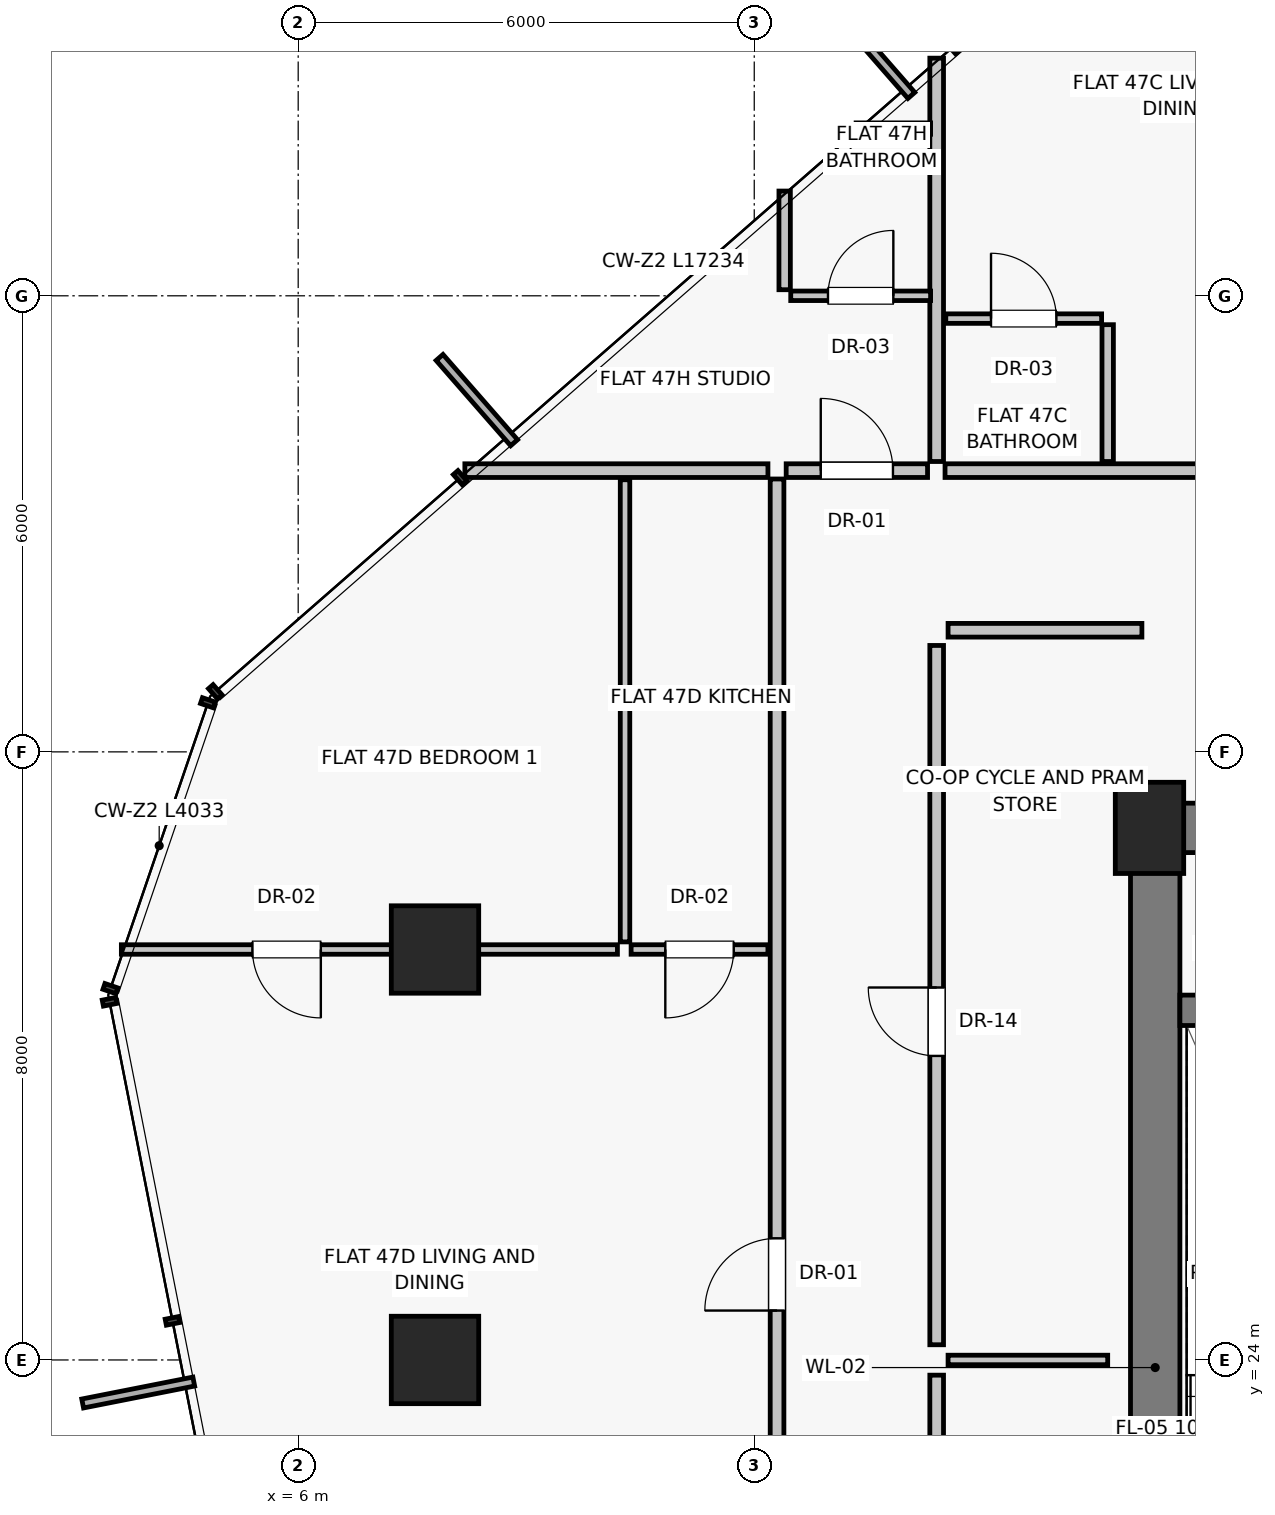
"""IFC4 building model, lengths in metres.
Left out: names, types, materials, properties, quantities, classifications, styles, units other than length and angle.
Written with IfcOpenShell. Run it as: python <this file> out.ifc"""

import sys

from ifc_helpers import new_model, si_unit, direction, frame, frame_2d, origin, origin_2d, place, context, subcontext, project, spatial, rectangle, extrude, source, transform, mapped, element, fill, save


model = new_model("IFC4")
c1 = context("Model", 3, precision=1e-05, world=origin(), true_north=direction((0.0, 1.0)))
c2 = subcontext(c1, "Body", "Model", "MODEL_VIEW")
j1 = project(units=[si_unit("LENGTHUNIT", "METRE"), si_unit("PLANEANGLEUNIT", "RADIAN")], contexts=[c1])
p1 = place(None, origin())
s1 = spatial("IfcSite", under=j1, at=p1, CompositionType="ELEMENT")
p2 = place(p1, origin())
s2 = spatial("IfcBuilding", under=s1, at=p2, CompositionType="ELEMENT")
p3 = place(p2, frame((0.0, 0.0, 166.3)))
s3 = spatial("IfcBuildingStorey", under=s2, at=p3, CompositionType="ELEMENT", Elevation=166.3)
p4 = place(p3, frame((17.2, 31.0, 0.0), z_axis=(0.0, 0.0, 1.0), x_axis=(1.0, 0.0, 0.0)))
e1 = element("IfcColumn", 1, at=p4, inside=s3, PredefinedType="PILASTER", context=c2, shape_type="SweptSolid", body=[
    extrude(rectangle(XDim=0.9, YDim=1.2, at=origin_2d()), origin(), (0.0, 0.0, 1.0), 3.25),
])
for number, where, z_axis, x_axis in (
    (2, (7.8, 29.4, 0.0), (0.0, 0.0, 1.0), (1.0, 0.0, 0.0)),
    (3, (7.8, 24.0, 0.0), (0.0, 0.0, 1.0), (1.0, 0.0, 0.0)),
):
    element("IfcColumn", number, at=place(p3, frame(where, z_axis=z_axis, x_axis=x_axis)), inside=s3, PredefinedType="COLUMN", context=c2, shape_type="SweptSolid", body=[
        extrude(rectangle(XDim=1.15, YDim=1.15, at=origin_2d()), origin(), (0.0, 0.0, 1.0), 3.25),
    ])
p5 = place(p3, frame((17.275, 16.8, 0.0), z_axis=(0.0, 0.0, 1.0), x_axis=(0.0, 1.0, 0.0)))
e4 = element("IfcWall", 4, at=p5, inside=s3, PredefinedType="SHEAR", context=c2, shape_type="SweptSolid", body=[
    extrude(rectangle(XDim=14.2, YDim=0.65, at=frame_2d((7.1, 0.0))), origin(), (0.0, 0.0, 1.0), 2.93),
])
p6 = place(p3, frame((17.2, 31.0, 0.0), z_axis=(0.0, 0.0, 1.0), x_axis=(1.0, 0.0, 0.0)))
e5 = element("IfcWall", 5, at=p6, inside=s3, PredefinedType="SHEAR", context=c2, shape_type="SweptSolid", body=[
    extrude(rectangle(XDim=3.8, YDim=0.65, at=frame_2d((1.9, 0.0))), origin(), (0.0, 0.0, 1.0), 2.93),
])
p7 = place(p6, frame((1.25, 0.0, 0.0)))
e6 = element("IfcOpeningElement", 6, at=p7, cuts=e5, PredefinedType="OPENING", context=c2, shape_type="SweptSolid", body=[
    extrude(rectangle(XDim=0.86, YDim=2.01, at=frame_2d((0.43, 1.005))), frame((0.0, 0.335, 0.0), z_axis=(0.0, -1.0, 0.0), x_axis=(1.0, 0.0, 0.0)), (0.0, 0.0, 1.0), 0.67),
])
p8 = place(p3, frame((17.6, 28.6, 0.0), z_axis=(0.0, 0.0, 1.0), x_axis=(1.0, 0.0, 0.0)))
e7 = element("IfcWall", 7, at=p8, inside=s3, PredefinedType="SHEAR", context=c2, shape_type="SweptSolid", body=[
    extrude(rectangle(XDim=3.4, YDim=0.4, at=frame_2d((1.7, 0.0))), origin(), (0.0, 0.0, 1.0), 2.93),
])
p9 = place(p3, frame((14.4, 14.4, 0.0), z_axis=(0.0, 0.0, 1.0), x_axis=(0.0, 1.0, 0.0)))
e8 = element("IfcWall", 8, at=p9, inside=s3, PredefinedType="PARTITIONING", context=c2, shape_type="SweptSolid", body=[
    extrude(rectangle(XDim=9.4, YDim=0.18, at=frame_2d((4.7, 0.0))), origin(), (0.0, 0.0, 1.0), 2.93),
])
p10 = place(p9, frame((3.8, 0.0, 0.0)))
e9 = element("IfcOpeningElement", 9, at=p10, cuts=e8, PredefinedType="OPENING", context=c2, shape_type="SweptSolid", body=[
    extrude(rectangle(XDim=0.9, YDim=2.01, at=frame_2d((0.45, 1.005))), frame((0.0, 0.1, 0.0), z_axis=(0.0, -1.0, 0.0), x_axis=(1.0, 0.0, 0.0)), (0.0, 0.0, 1.0), 0.2),
])
p11 = place(p3, frame((14.4, 24.2, 0.0), z_axis=(0.0, 0.0, 1.0), x_axis=(0.0, 1.0, 0.0)))
e10 = element("IfcWall", 10, at=p11, inside=s3, PredefinedType="PARTITIONING", context=c2, shape_type="SweptSolid", body=[
    extrude(rectangle(XDim=9.2, YDim=0.18, at=frame_2d((4.6, 0.0))), origin(), (0.0, 0.0, 1.0), 2.93),
])
p12 = place(p11, frame((3.8, 0.0, 0.0)))
e11 = element("IfcOpeningElement", 11, at=p12, cuts=e10, PredefinedType="OPENING", context=c2, shape_type="SweptSolid", body=[
    extrude(rectangle(XDim=0.9, YDim=2.01, at=frame_2d((0.45, 1.005))), frame((0.0, 0.1, 0.0), z_axis=(0.0, -1.0, 0.0), x_axis=(1.0, 0.0, 0.0)), (0.0, 0.0, 1.0), 0.2),
])
p13 = place(p3, frame((14.55, 24.0, 0.0), z_axis=(0.0, 0.0, 1.0), x_axis=(1.0, 0.0, 0.0)))
e12 = element("IfcWall", 12, at=p13, inside=s3, PredefinedType="PARTITIONING", context=c2, shape_type="SweptSolid", body=[
    extrude(rectangle(XDim=2.1, YDim=0.125, at=frame_2d((1.05, 0.0))), origin(), (0.0, 0.0, 1.0), 2.93),
])
p14 = place(p3, frame((14.55, 33.6, 0.0), z_axis=(0.0, 0.0, 1.0), x_axis=(1.0, 0.0, 0.0)))
e13 = element("IfcWall", 13, at=p14, inside=s3, PredefinedType="PARTITIONING", context=c2, shape_type="SweptSolid", body=[
    extrude(rectangle(XDim=2.55, YDim=0.18, at=frame_2d((1.275, 0.0))), origin(), (0.0, 0.0, 1.0), 2.93),
])
p15 = place(p3, frame((14.4, 35.82, 0.0), z_axis=(0.0, 0.0, 1.0), x_axis=(0.0, 1.0, 0.0)))
e14 = element("IfcWall", 14, at=p15, inside=s3, PredefinedType="PARTITIONING", context=c2, shape_type="SweptSolid", body=[
    extrude(rectangle(XDim=5.306, YDim=0.18, at=frame_2d((2.653, 0.0))), origin(), (0.0, 0.0, 1.0), 2.93),
])
p16 = place(p3, frame((14.51, 35.7, 0.0), z_axis=(0.0, 0.0, 1.0), x_axis=(1.0, 0.0, 0.0)))
e15 = element("IfcWall", 15, at=p16, inside=s3, PredefinedType="PARTITIONING", context=c2, shape_type="SweptSolid", body=[
    extrude(rectangle(XDim=11.904, YDim=0.18, at=frame_2d((5.952, 0.0))), origin(), (0.0, 0.0, 1.0), 2.51),
])
p17 = place(p16, frame((3.874, 0.0, 0.0)))
e16 = element("IfcOpeningElement", 16, at=p17, cuts=e15, PredefinedType="OPENING", context=c2, shape_type="SweptSolid", body=[
    extrude(rectangle(XDim=0.95, YDim=2.02, at=frame_2d((0.475, 1.01))), frame((0.0, 0.1, 0.0), z_axis=(0.0, -1.0, 0.0), x_axis=(1.0, 0.0, 0.0)), (0.0, 0.0, 1.0), 0.2),
])
p18 = place(p3, frame((16.65, 35.82, 0.0), z_axis=(0.0, 0.0, 1.0), x_axis=(0.0, 1.0, 0.0)))
e17 = element("IfcWall", 17, at=p18, inside=s3, PredefinedType="PARTITIONING", context=c2, shape_type="SweptSolid", body=[
    extrude(rectangle(XDim=1.8, YDim=0.15, at=frame_2d((0.9, 0.0))), origin(), (0.0, 0.0, 1.0), 2.93),
])
p19 = place(p3, frame((14.52, 37.7, 0.0), z_axis=(0.0, 0.0, 1.0), x_axis=(1.0, 0.0, 0.0)))
e18 = element("IfcWall", 18, at=p19, inside=s3, PredefinedType="PARTITIONING", context=c2, shape_type="SweptSolid", body=[
    extrude(rectangle(XDim=2.05, YDim=0.125, at=frame_2d((1.025, 0.0))), origin(), (0.0, 0.0, 1.0), 2.93),
])
p20 = place(p19, frame((0.595, 0.0, 0.0)))
e19 = element("IfcOpeningElement", 19, at=p20, cuts=e18, PredefinedType="OPENING", context=c2, shape_type="SweptSolid", body=[
    extrude(rectangle(XDim=0.86, YDim=2.01, at=frame_2d((0.43, 1.005))), frame((0.0, 0.073, 0.0), z_axis=(0.0, -1.0, 0.0), x_axis=(1.0, 0.0, 0.0)), (0.0, 0.0, 1.0), 0.145),
])
p21 = place(p3, frame((12.18, 35.7, 0.0), z_axis=(0.0, 0.0, 1.0), x_axis=(-1.0, 0.0, 0.0)))
e20 = element("IfcWall", 20, at=p21, inside=s3, PredefinedType="PARTITIONING", context=c2, shape_type="SweptSolid", body=[
    extrude(rectangle(XDim=3.987, YDim=0.18, at=frame_2d((1.994, 0.0))), origin(), (0.0, 0.0, 1.0), 2.93),
])
p22 = place(p3, frame((12.3, 18.71, 0.0), z_axis=(0.0, 0.0, 1.0), x_axis=(0.0, 1.0, 0.0)))
e21 = element("IfcWall", 21, at=p22, inside=s3, PredefinedType="PARTITIONING", context=c2, shape_type="SweptSolid", body=[
    extrude(rectangle(XDim=16.88, YDim=0.18, at=frame_2d((8.44, 0.0))), origin(), (0.0, 0.0, 1.0), 2.51),
])
p23 = place(p22, frame((5.94, 0.0, 0.0)))
e22 = element("IfcOpeningElement", 22, at=p23, cuts=e21, PredefinedType="OPENING", context=c2, shape_type="SweptSolid", body=[
    extrude(rectangle(XDim=0.95, YDim=2.02, at=frame_2d((0.475, 1.01))), frame((0.0, 0.1, 0.0), z_axis=(0.0, -1.0, 0.0), x_axis=(1.0, 0.0, 0.0)), (0.0, 0.0, 1.0), 0.2),
])
p24 = place(p3, frame((12.18, 29.4, 0.0), z_axis=(0.0, 0.0, 1.0), x_axis=(-1.0, 0.0, 0.0)))
e23 = element("IfcWall", 23, at=p24, inside=s3, PredefinedType="PARTITIONING", context=c2, shape_type="SweptSolid", body=[
    extrude(rectangle(XDim=1.8, YDim=0.125, at=frame_2d((0.9, 0.0))), origin(), (0.0, 0.0, 1.0), 2.308),
])
p25 = place(p24, frame((0.45, 0.0, 0.0)))
e24 = element("IfcOpeningElement", 24, at=p25, cuts=e23, PredefinedType="OPENING", context=c2, shape_type="SweptSolid", body=[
    extrude(rectangle(XDim=0.9, YDim=2.01, at=frame_2d((0.45, 1.005))), frame((0.0, 0.073, 0.0), z_axis=(0.0, -1.0, 0.0), x_axis=(1.0, 0.0, 0.0)), (0.0, 0.0, 1.0), 0.145),
])
p26 = place(p3, frame((10.3, 29.5, 0.0), z_axis=(0.0, 0.0, 1.0), x_axis=(0.0, 1.0, 0.0)))
e25 = element("IfcWall", 25, at=p26, inside=s3, PredefinedType="PARTITIONING", context=c2, shape_type="SweptSolid", body=[
    extrude(rectangle(XDim=6.08, YDim=0.125, at=frame_2d((3.04, 0.0))), origin(), (0.0, 0.0, 1.0), 2.93),
])
p27 = place(p3, frame((10.2, 29.4, 0.0), z_axis=(0.0, 0.0, 1.0), x_axis=(-1.0, 0.0, 0.0)))
e26 = element("IfcWall", 26, at=p27, inside=s3, PredefinedType="PARTITIONING", context=c2, shape_type="SweptSolid", body=[
    extrude(rectangle(XDim=6.526, YDim=0.125, at=frame_2d((3.263, 0.0))), origin(), (0.0, 0.0, 1.0), 2.308),
])
p28 = place(p27, frame((3.902, 0.0, 0.0)))
e27 = element("IfcOpeningElement", 27, at=p28, cuts=e26, PredefinedType="OPENING", context=c2, shape_type="SweptSolid", body=[
    extrude(rectangle(XDim=0.9, YDim=2.01, at=frame_2d((0.45, 1.005))), frame((0.0, 0.073, 0.0), z_axis=(0.0, -1.0, 0.0), x_axis=(1.0, 0.0, 0.0)), (0.0, 0.0, 1.0), 0.145),
])
p29 = place(p3, frame((12.42, 35.7, 0.0), z_axis=(0.0, 0.0, 1.0), x_axis=(1.0, 0.0, 0.0)))
e28 = element("IfcWall", 28, at=p29, inside=s3, PredefinedType="PARTITIONING", context=c2, shape_type="SweptSolid", body=[
    extrude(rectangle(XDim=1.86, YDim=0.18, at=frame_2d((0.93, 0.0))), origin(), (0.0, 0.0, 1.0), 2.93),
])
p30 = place(p29, frame((0.455, 0.0, 0.0)))
e29 = element("IfcOpeningElement", 29, at=p30, cuts=e28, PredefinedType="OPENING", context=c2, shape_type="SweptSolid", body=[
    extrude(rectangle(XDim=0.95, YDim=2.02, at=frame_2d((0.475, 1.01))), frame((0.0, 0.1, 0.0), z_axis=(0.0, -1.0, 0.0), x_axis=(1.0, 0.0, 0.0)), (0.0, 0.0, 1.0), 0.2),
])
p31 = place(p3, frame((12.48, 38.0, 0.0), z_axis=(0.0, 0.0, 1.0), x_axis=(1.0, 0.0, 0.0)))
e30 = element("IfcWall", 30, at=p31, inside=s3, PredefinedType="PARTITIONING", context=c2, shape_type="SweptSolid", body=[
    extrude(rectangle(XDim=1.84, YDim=0.125, at=frame_2d((0.92, 0.0))), origin(), (0.0, 0.0, 1.0), 2.93),
])
p32 = place(p31, frame((0.49, 0.0, 0.0)))
e31 = element("IfcOpeningElement", 31, at=p32, cuts=e30, PredefinedType="OPENING", context=c2, shape_type="SweptSolid", body=[
    extrude(rectangle(XDim=0.86, YDim=2.01, at=frame_2d((0.43, 1.005))), frame((0.0, 0.073, 0.0), z_axis=(0.0, -1.0, 0.0), x_axis=(1.0, 0.0, 0.0)), (0.0, 0.0, 1.0), 0.145),
])
p33 = place(p3, frame((13.34, 40.2, 0.0), z_axis=(0.0, 0.0, 1.0), x_axis=(1.0, 0.0, 0.0)))
e32 = element("IfcWall", 32, at=p33, inside=s3, PredefinedType="PARTITIONING", context=c2, shape_type="SweptSolid", body=[
    extrude(rectangle(XDim=0.98, YDim=0.15, at=frame_2d((0.49, 0.0))), origin(), (0.0, 0.0, 1.0), 2.93),
])
p34 = place(p3, frame((12.4, 38.08, 0.0), z_axis=(0.0, 0.0, 1.0), x_axis=(0.0, 1.0, 0.0)))
e33 = element("IfcWall", 33, at=p34, inside=s3, PredefinedType="PARTITIONING", context=c2, shape_type="SweptSolid", body=[
    extrude(rectangle(XDim=1.298, YDim=0.15, at=frame_2d((0.649, 0.0))), origin(), (0.0, 0.0, 1.0), 2.93),
])
m1 = source(origin(), c2, "Body", "SweptSolid", [
    extrude(rectangle(XDim=0.9, YDim=2.01, at=frame_2d((0.45, 1.005))), frame((0.0, 0.025, 0.0), z_axis=(0.0, -1.0, 0.0), x_axis=(1.0, 0.0, 0.0)), (0.0, 0.0, 1.0), 0.05),
])
p35 = place(p12, origin())
e34 = element("IfcDoor", 34, at=p35, inside=s3, OperationType="SINGLE_SWING_RIGHT", PredefinedType="DOOR", context=c2, shape_type="MappedRepresentation", body=[
    mapped(m1, transform((0.0, 0.0, 0.0), scale=1.0)),
])
fill(e11, e34)
m2 = source(origin(), c2, "Body", "SweptSolid", [
    extrude(rectangle(XDim=0.86, YDim=2.01, at=frame_2d((0.43, 1.005))), frame((0.0, 0.025, 0.0), z_axis=(0.0, -1.0, 0.0), x_axis=(1.0, 0.0, 0.0)), (0.0, 0.0, 1.0), 0.05),
])
p36 = place(p20, origin())
e35 = element("IfcDoor", 35, at=p36, inside=s3, OperationType="SINGLE_SWING_LEFT", PredefinedType="DOOR", context=c2, shape_type="MappedRepresentation", body=[
    mapped(m2, transform((0.0, 0.0, 0.0), scale=1.0)),
])
fill(e19, e35)
m3 = source(origin(), c2, "Body", "SweptSolid", [
    extrude(rectangle(XDim=0.95, YDim=2.02, at=frame_2d((0.475, 1.01))), frame((0.0, 0.025, 0.0), z_axis=(0.0, -1.0, 0.0), x_axis=(1.0, 0.0, 0.0)), (0.0, 0.0, 1.0), 0.05),
])
p37 = place(p23, origin())
e36 = element("IfcDoor", 36, at=p37, inside=s3, OperationType="SINGLE_SWING_LEFT", PredefinedType="DOOR", context=c2, shape_type="MappedRepresentation", body=[
    mapped(m3, transform((0.0, 0.0, 0.0), scale=1.0)),
])
fill(e22, e36)
p38 = place(p25, origin())
e37 = element("IfcDoor", 37, at=p38, inside=s3, OperationType="SINGLE_SWING_RIGHT", PredefinedType="DOOR", context=c2, shape_type="MappedRepresentation", body=[
    mapped(m1, transform((0.0, 0.0, 0.0), scale=1.0)),
])
fill(e24, e37)
p39 = place(p28, origin())
e38 = element("IfcDoor", 38, at=p39, inside=s3, OperationType="SINGLE_SWING_LEFT", PredefinedType="DOOR", context=c2, shape_type="MappedRepresentation", body=[
    mapped(m1, transform((0.0, 0.0, 0.0), scale=1.0)),
])
fill(e27, e38)
p40 = place(p30, origin())
e39 = element("IfcDoor", 39, at=p40, inside=s3, OperationType="SINGLE_SWING_LEFT", PredefinedType="DOOR", context=c2, shape_type="MappedRepresentation", body=[
    mapped(m3, transform((0.0, 0.0, 0.0), scale=1.0)),
])
fill(e29, e39)
p41 = place(p32, origin())
e40 = element("IfcDoor", 40, at=p41, inside=s3, OperationType="SINGLE_SWING_RIGHT", PredefinedType="DOOR", context=c2, shape_type="MappedRepresentation", body=[
    mapped(m2, transform((0.0, 0.0, 0.0), scale=1.0)),
])
fill(e31, e40)
save(model, sys.argv[1])
